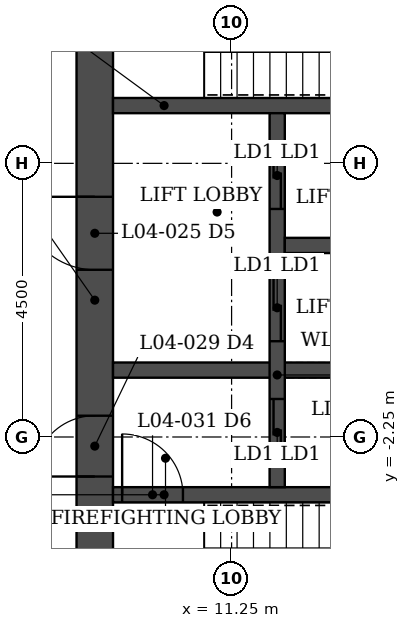
"""IFC4 building model, lengths in metres.
Left out: names, types, materials, properties, quantities, classifications, styles, units other than length and angle.
Written with IfcOpenShell. Run it as: python <this file> out.ifc"""

import sys

from ifc_helpers import new_model, si_unit, direction, frame, frame_2d, origin, place, context, subcontext, project, spatial, rectangle, extrude, element, fill, save


model = new_model("IFC4")
c1 = context("Model", 3, precision=1e-05, world=origin(), true_north=direction((0.0, 1.0)))
c2 = subcontext(c1, "Body", "Model", "MODEL_VIEW")
j1 = project(units=[si_unit("LENGTHUNIT", "METRE"), si_unit("PLANEANGLEUNIT", "RADIAN")], contexts=[c1])
p1 = place(None, origin())
s1 = spatial("IfcSite", under=j1, at=p1, CompositionType="ELEMENT")
p2 = place(p1, origin())
s2 = spatial("IfcBuilding", under=s1, at=p2, CompositionType="ELEMENT")
p3 = place(p2, frame((0.0, 0.0, 21.5)))
s3 = spatial("IfcBuildingStorey", under=s2, at=p3, CompositionType="ELEMENT", Elevation=21.5)
p4 = place(p3, frame((9.0, -6.45, 0.0), z_axis=(0.0, 0.0, 1.0), x_axis=(0.0, 1.0, 0.0)))
e1 = element("IfcWall", 1, at=p4, inside=s3, PredefinedType="SHEAR", context=c2, shape_type="SweptSolid", body=[
    extrude(rectangle(XDim=12.9, YDim=0.6, at=frame_2d((6.45, 0.0))), origin(), (0.0, 0.0, 1.0), 5.0),
])
p5 = place(p4, frame((3.55, 0.0, 0.0)))
e2 = element("IfcOpeningElement", 2, at=p5, cuts=e1, PredefinedType="OPENING", context=c2, shape_type="SweptSolid", body=[
    extrude(rectangle(XDim=1.0, YDim=2.1, at=frame_2d((0.5, 1.05))), frame((0.0, 0.31, 0.0), z_axis=(0.0, -1.0, 0.0), x_axis=(1.0, 0.0, 0.0)), (0.0, 0.0, 1.0), 0.62),
])
p6 = place(p4, frame((6.95, 0.0, 0.0)))
e3 = element("IfcOpeningElement", 3, at=p6, cuts=e1, PredefinedType="OPENING", context=c2, shape_type="SweptSolid", body=[
    extrude(rectangle(XDim=1.2, YDim=2.1, at=frame_2d((0.6, 1.05))), frame((0.0, 0.31, 0.0), z_axis=(0.0, -1.0, 0.0), x_axis=(1.0, 0.0, 0.0)), (0.0, 0.0, 1.0), 0.62),
])
p7 = place(p4, frame((10.85, 0.0, 0.0)))
e4 = element("IfcOpeningElement", 4, at=p7, cuts=e1, PredefinedType="OPENING", context=c2, shape_type="SweptSolid", body=[
    extrude(rectangle(XDim=1.0, YDim=2.1, at=frame_2d((0.5, 1.05))), frame((0.0, 0.31, 0.0), z_axis=(0.0, -1.0, 0.0), x_axis=(1.0, 0.0, 0.0)), (0.0, 0.0, 1.0), 0.62),
])
p8 = place(p3, frame((9.3, -3.2, 0.0), z_axis=(0.0, 0.0, 1.0), x_axis=(1.0, 0.0, 0.0)))
e5 = element("IfcWall", 5, at=p8, inside=s3, PredefinedType="SHEAR", context=c2, shape_type="SweptSolid", body=[
    extrude(rectangle(XDim=8.4, YDim=0.25, at=frame_2d((4.2, 0.0))), origin(), (0.0, 0.0, 1.0), 5.0),
])
p9 = place(p8, frame((0.15, 0.0, 0.0)))
e6 = element("IfcOpeningElement", 6, at=p9, cuts=e5, PredefinedType="OPENING", context=c2, shape_type="SweptSolid", body=[
    extrude(rectangle(XDim=1.0, YDim=2.1, at=frame_2d((0.5, 1.05))), frame((0.0, 0.135, 0.0), z_axis=(0.0, -1.0, 0.0), x_axis=(1.0, 0.0, 0.0)), (0.0, 0.0, 1.0), 0.27),
])
p10 = place(p3, frame((9.3, 3.2, 0.0), z_axis=(0.0, 0.0, 1.0), x_axis=(1.0, 0.0, 0.0)))
e7 = element("IfcWall", 7, at=p10, inside=s3, PredefinedType="SHEAR", context=c2, shape_type="SweptSolid", body=[
    extrude(rectangle(XDim=8.4, YDim=0.25, at=frame_2d((4.2, 0.0))), origin(), (0.0, 0.0, 1.0), 5.0),
])
p11 = place(p3, frame((9.3, -1.15, 0.0), z_axis=(0.0, 0.0, 1.0), x_axis=(1.0, 0.0, 0.0)))
e8 = element("IfcWall", 8, at=p11, inside=s3, PredefinedType="SHEAR", context=c2, shape_type="SweptSolid", body=[
    extrude(rectangle(XDim=5.375, YDim=0.25, at=frame_2d((2.688, 0.0))), origin(), (0.0, 0.0, 1.0), 5.0),
])
p12 = place(p3, frame((12.0, -3.075, 0.0), z_axis=(0.0, 0.0, 1.0), x_axis=(0.0, 1.0, 0.0)))
e9 = element("IfcWall", 9, at=p12, inside=s3, PredefinedType="SHEAR", context=c2, shape_type="SweptSolid", body=[
    extrude(rectangle(XDim=6.15, YDim=0.25, at=frame_2d((3.075, 0.0))), origin(), (0.0, 0.0, 1.0), 5.0),
])
p13 = place(p12, frame((0.35, 0.0, 0.0)))
e10 = element("IfcOpeningElement", 10, at=p13, cuts=e9, PredefinedType="OPENING", context=c2, shape_type="SweptSolid", body=[
    extrude(rectangle(XDim=1.1, YDim=2.1, at=frame_2d((0.55, 1.05))), frame((0.0, 0.135, 0.0), z_axis=(0.0, -1.0, 0.0), x_axis=(1.0, 0.0, 0.0)), (0.0, 0.0, 1.0), 0.27),
])
p14 = place(p12, frame((2.4, 0.0, 0.0)))
e11 = element("IfcOpeningElement", 11, at=p14, cuts=e9, PredefinedType="OPENING", context=c2, shape_type="SweptSolid", body=[
    extrude(rectangle(XDim=1.1, YDim=2.1, at=frame_2d((0.55, 1.05))), frame((0.0, 0.135, 0.0), z_axis=(0.0, -1.0, 0.0), x_axis=(1.0, 0.0, 0.0)), (0.0, 0.0, 1.0), 0.27),
])
p15 = place(p12, frame((4.575, 0.0, 0.0)))
e12 = element("IfcOpeningElement", 12, at=p15, cuts=e9, PredefinedType="OPENING", context=c2, shape_type="SweptSolid", body=[
    extrude(rectangle(XDim=1.1, YDim=2.1, at=frame_2d((0.55, 1.05))), frame((0.0, 0.135, 0.0), z_axis=(0.0, -1.0, 0.0), x_axis=(1.0, 0.0, 0.0)), (0.0, 0.0, 1.0), 0.27),
])
p16 = place(p3, frame((12.125, 0.9, 0.0), z_axis=(0.0, 0.0, 1.0), x_axis=(1.0, 0.0, 0.0)))
e13 = element("IfcWall", 13, at=p16, inside=s3, PredefinedType="SHEAR", context=c2, shape_type="SweptSolid", body=[
    extrude(rectangle(XDim=2.55, YDim=0.25, at=frame_2d((1.275, 0.0))), origin(), (0.0, 0.0, 1.0), 5.0),
])
p17 = place(p5, origin())
e14 = element("IfcDoor", 14, at=p17, inside=s3, OperationType="SINGLE_SWING_LEFT", PredefinedType="DOOR", context=c2, shape_type="SweptSolid", body=[
    extrude(rectangle(XDim=1.0, YDim=2.1, at=frame_2d((0.5, 1.05))), frame((0.0, 0.025, 0.0), z_axis=(0.0, -1.0, 0.0), x_axis=(1.0, 0.0, 0.0)), (0.0, 0.0, 1.0), 0.05),
])
fill(e2, e14)
p18 = place(p9, origin())
e15 = element("IfcDoor", 15, at=p18, inside=s3, OperationType="SINGLE_SWING_LEFT", PredefinedType="DOOR", context=c2, shape_type="SweptSolid", body=[
    extrude(rectangle(XDim=1.0, YDim=2.1, at=frame_2d((0.5, 1.05))), frame((0.0, 0.025, 0.0), z_axis=(0.0, -1.0, 0.0), x_axis=(1.0, 0.0, 0.0)), (0.0, 0.0, 1.0), 0.05),
])
fill(e6, e15)
p19 = place(p6, origin())
e16 = element("IfcDoor", 16, at=p19, inside=s3, OperationType="SINGLE_SWING_RIGHT", PredefinedType="DOOR", context=c2, shape_type="SweptSolid", body=[
    extrude(rectangle(XDim=1.2, YDim=2.1, at=frame_2d((0.6, 1.05))), frame((0.0, 0.025, 0.0), z_axis=(0.0, -1.0, 0.0), x_axis=(1.0, 0.0, 0.0)), (0.0, 0.0, 1.0), 0.05),
])
fill(e3, e16)
p20 = place(p13, origin())
e17 = element("IfcDoor", 17, at=p20, inside=s3, OperationType="DOUBLE_DOOR_SLIDING", PredefinedType="DOOR", context=c2, shape_type="SweptSolid", body=[
    extrude(rectangle(XDim=1.1, YDim=2.1, at=frame_2d((0.55, 1.05))), frame((0.0, 0.025, 0.0), z_axis=(0.0, -1.0, 0.0), x_axis=(1.0, 0.0, 0.0)), (0.0, 0.0, 1.0), 0.05),
])
fill(e10, e17)
p21 = place(p14, origin())
e18 = element("IfcDoor", 18, at=p21, inside=s3, OperationType="DOUBLE_DOOR_SLIDING", PredefinedType="DOOR", context=c2, shape_type="SweptSolid", body=[
    extrude(rectangle(XDim=1.1, YDim=2.1, at=frame_2d((0.55, 1.05))), frame((0.0, 0.025, 0.0), z_axis=(0.0, -1.0, 0.0), x_axis=(1.0, 0.0, 0.0)), (0.0, 0.0, 1.0), 0.05),
])
fill(e11, e18)
p22 = place(p15, origin())
e19 = element("IfcDoor", 19, at=p22, inside=s3, OperationType="DOUBLE_DOOR_SLIDING", PredefinedType="DOOR", context=c2, shape_type="SweptSolid", body=[
    extrude(rectangle(XDim=1.1, YDim=2.1, at=frame_2d((0.55, 1.05))), frame((0.0, 0.025, 0.0), z_axis=(0.0, -1.0, 0.0), x_axis=(1.0, 0.0, 0.0)), (0.0, 0.0, 1.0), 0.05),
])
fill(e12, e19)
save(model, sys.argv[1])
